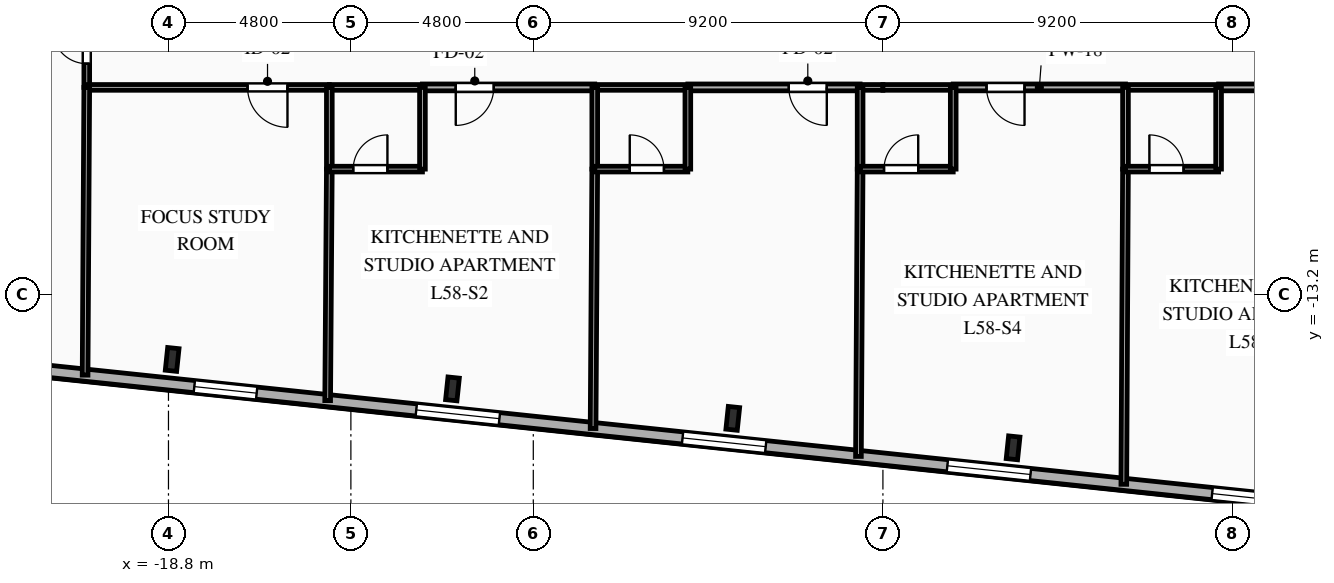
"""IFC4 building model, lengths in metres.
Left out: names, types, materials, properties, quantities, classifications, styles, units other than length and angle.
Written with IfcOpenShell. Run it as: python <this file> out.ifc"""

import sys

from ifc_helpers import new_model, si_unit, direction, frame, frame_2d, origin, origin_2d, place, context, subcontext, project, spatial, rectangle, i_section, extrude, element, fill, save


model = new_model("IFC4")
c1 = context("Model", 3, precision=1e-05, world=origin(), true_north=direction((0.0, 1.0)))
c2 = subcontext(c1, "Body", "Model", "MODEL_VIEW")
j1 = project(units=[si_unit("LENGTHUNIT", "METRE"), si_unit("PLANEANGLEUNIT", "RADIAN")], contexts=[c1])
p1 = place(None, origin())
s1 = spatial("IfcSite", under=j1, at=p1, CompositionType="ELEMENT")
p2 = place(p1, origin())
s2 = spatial("IfcBuilding", under=s1, at=p2, CompositionType="ELEMENT")
p3 = place(p2, frame((0.0, 0.0, 206.45)))
s3 = spatial("IfcBuildingStorey", under=s2, at=p3, CompositionType="ELEMENT", Elevation=206.45)
for number, where, z_axis, x_axis in (
    (1, (-18.703, -14.908, 0.0), (0.0, 0.0, 1.0), (0.995, -0.105, 0.0)),
    (2, (-11.327, -15.683, 0.0), (0.0, 0.0, 1.0), (0.995, -0.105, 0.0)),
    (3, (-3.951, -16.458, 0.0), (0.0, 0.0, 1.0), (0.995, -0.105, 0.0)),
    (4, (3.425, -17.233, 0.0), (0.0, 0.0, 1.0), (0.995, -0.105, 0.0)),
):
    element("IfcColumn", number, at=place(p3, frame(where, z_axis=z_axis, x_axis=x_axis)), inside=s3, PredefinedType="COLUMN", context=c2, shape_type="SweptSolid", body=[
        extrude(i_section(OverallWidth=0.3, OverallDepth=0.6, WebThickness=0.015, FlangeThickness=0.03, FilletRadius=0.027, at=origin_2d()), origin(), (0.0, 0.0, 1.0), 3.35),
    ])
p4 = place(p3, frame((18.756, -19.498, 0.0), z_axis=(0.0, 0.0, 1.0), x_axis=(-0.994522060044, 0.104526896475, 0.0)))
e5 = element("IfcWall", 5, at=p4, inside=s3, PredefinedType="SOLIDWALL", context=c2, shape_type="SweptSolid", body=[
    extrude(rectangle(XDim=45.8, YDim=0.32, at=frame_2d((22.9, 0.0))), origin(), (0.0, 0.0, 1.0), 3.04),
])
p5 = place(p4, frame((2.778, 0.0, 0.85)))
e6 = element("IfcOpeningElement", 6, at=p5, cuts=e5, PredefinedType="OPENING", context=c2, shape_type="SweptSolid", body=[
    extrude(rectangle(XDim=1.65, YDim=1.85, at=frame_2d((0.825, 0.925))), frame((0.0, 0.17, 0.0), z_axis=(0.0, -1.0, 0.0), x_axis=(1.0, 0.0, 0.0)), (0.0, 0.0, 1.0), 0.34),
])
p6 = place(p4, frame((7.948, 0.0, 0.85)))
e7 = element("IfcOpeningElement", 7, at=p6, cuts=e5, PredefinedType="OPENING", context=c2, shape_type="SweptSolid", body=[
    extrude(rectangle(XDim=2.2, YDim=1.85, at=frame_2d((1.1, 0.925))), frame((0.0, 0.17, 0.0), z_axis=(0.0, -1.0, 0.0), x_axis=(1.0, 0.0, 0.0)), (0.0, 0.0, 1.0), 0.34),
])
p7 = place(p4, frame((14.954, 0.0, 0.85)))
e8 = element("IfcOpeningElement", 8, at=p7, cuts=e5, PredefinedType="OPENING", context=c2, shape_type="SweptSolid", body=[
    extrude(rectangle(XDim=2.2, YDim=1.85, at=frame_2d((1.1, 0.925))), frame((0.0, 0.17, 0.0), z_axis=(0.0, -1.0, 0.0), x_axis=(1.0, 0.0, 0.0)), (0.0, 0.0, 1.0), 0.34),
])
p8 = place(p4, frame((21.96, 0.0, 0.85)))
e9 = element("IfcOpeningElement", 9, at=p8, cuts=e5, PredefinedType="OPENING", context=c2, shape_type="SweptSolid", body=[
    extrude(rectangle(XDim=2.2, YDim=1.85, at=frame_2d((1.1, 0.925))), frame((0.0, 0.17, 0.0), z_axis=(0.0, -1.0, 0.0), x_axis=(1.0, 0.0, 0.0)), (0.0, 0.0, 1.0), 0.34),
])
p9 = place(p4, frame((29.006, 0.0, 0.85)))
e10 = element("IfcOpeningElement", 10, at=p9, cuts=e5, PredefinedType="OPENING", context=c2, shape_type="SweptSolid", body=[
    extrude(rectangle(XDim=2.2, YDim=1.85, at=frame_2d((1.1, 0.925))), frame((0.0, 0.17, 0.0), z_axis=(0.0, -1.0, 0.0), x_axis=(1.0, 0.0, 0.0)), (0.0, 0.0, 1.0), 0.34),
])
p10 = place(p4, frame((35.429, 0.0, 0.85)))
e11 = element("IfcOpeningElement", 11, at=p10, cuts=e5, PredefinedType="OPENING", context=c2, shape_type="SweptSolid", body=[
    extrude(rectangle(XDim=1.65, YDim=1.85, at=frame_2d((0.825, 0.925))), frame((0.0, 0.17, 0.0), z_axis=(0.0, -1.0, 0.0), x_axis=(1.0, 0.0, 0.0)), (0.0, 0.0, 1.0), 0.34),
])
p11 = place(p4, frame((41.212, 0.0, 0.85)))
e12 = element("IfcOpeningElement", 12, at=p11, cuts=e5, PredefinedType="OPENING", context=c2, shape_type="SweptSolid", body=[
    extrude(rectangle(XDim=1.65, YDim=1.85, at=frame_2d((0.825, 0.925))), frame((0.0, 0.17, 0.0), z_axis=(0.0, -1.0, 0.0), x_axis=(1.0, 0.0, 0.0)), (0.0, 0.0, 1.0), 0.34),
])
p12 = place(p3, frame((-20.95, -7.75, 0.0), z_axis=(0.0, 0.0, 1.0), x_axis=(0.0, 1.0, 0.0)))
e13 = element("IfcWall", 13, at=p12, inside=s3, PredefinedType="PARTITIONING", context=c2, shape_type="SweptSolid", body=[
    extrude(rectangle(XDim=2.15, YDim=0.15, at=frame_2d((1.075, 0.0))), origin(), (0.0, 0.0, 1.0), 3.04),
])
p13 = place(p12, frame((0.625, 0.0, 0.0)))
e14 = element("IfcOpeningElement", 14, at=p13, cuts=e13, PredefinedType="OPENING", context=c2, shape_type="SweptSolid", body=[
    extrude(rectangle(XDim=0.9, YDim=2.1, at=frame_2d((0.45, 1.05))), frame((0.0, 0.085, 0.0), z_axis=(0.0, -1.0, 0.0), x_axis=(1.0, 0.0, 0.0)), (0.0, 0.0, 1.0), 0.17),
])
p14 = place(p3, frame((-14.567, -7.75, 0.0), z_axis=(0.0, 0.0, 1.0), x_axis=(-1.0, 0.0, 0.0)))
e15 = element("IfcWall", 15, at=p14, inside=s3, PredefinedType="PARTITIONING", context=c2, shape_type="SweptSolid", body=[
    extrude(rectangle(XDim=6.383, YDim=0.15, at=frame_2d((3.191, 0.0))), origin(), (0.0, 0.0, 1.0), 3.04),
])
p15 = place(p14, frame((1.102, 0.0, 0.0)))
e16 = element("IfcOpeningElement", 16, at=p15, cuts=e15, PredefinedType="OPENING", context=c2, shape_type="SweptSolid", body=[
    extrude(rectangle(XDim=1.05, YDim=2.15, at=frame_2d((0.525, 1.075))), frame((0.0, 0.085, 0.0), z_axis=(0.0, -1.0, 0.0), x_axis=(1.0, 0.0, 0.0)), (0.0, 0.0, 1.0), 0.17),
])
p16 = place(p3, frame((-7.583, -7.75, 0.0), z_axis=(0.0, 0.0, 1.0), x_axis=(-1.0, 0.0, 0.0)))
e17 = element("IfcWall", 17, at=p16, inside=s3, PredefinedType="PARTITIONING", context=c2, shape_type="SweptSolid", body=[
    extrude(rectangle(XDim=4.534, YDim=0.18, at=frame_2d((2.267, 0.0))), origin(), (0.0, 0.0, 1.0), 3.04),
])
p17 = place(p16, frame((2.657, 0.0, 0.0)))
e18 = element("IfcOpeningElement", 18, at=p17, cuts=e17, PredefinedType="OPENING", context=c2, shape_type="SweptSolid", body=[
    extrude(rectangle(XDim=1.0, YDim=2.15, at=frame_2d((0.5, 1.075))), frame((0.0, 0.1, 0.0), z_axis=(0.0, -1.0, 0.0), x_axis=(1.0, 0.0, 0.0)), (0.0, 0.0, 1.0), 0.2),
])
p18 = place(p3, frame((-12.117, -7.75, 0.0), z_axis=(0.0, 0.0, 1.0), x_axis=(-1.0, 0.0, 0.0)))
e19 = element("IfcWall", 19, at=p18, inside=s3, PredefinedType="PLUMBINGWALL", context=c2, shape_type="SweptSolid", body=[
    extrude(rectangle(XDim=2.45, YDim=0.15, at=frame_2d((1.225, 0.0))), origin(), (0.0, 0.0, 1.0), 3.04),
])
p19 = place(p3, frame((-0.6, -7.75, 0.0), z_axis=(0.0, 0.0, 1.0), x_axis=(-1.0, 0.0, 0.0)))
e20 = element("IfcWall", 20, at=p19, inside=s3, PredefinedType="PARTITIONING", context=c2, shape_type="SweptSolid", body=[
    extrude(rectangle(XDim=4.533, YDim=0.18, at=frame_2d((2.267, 0.0))), origin(), (0.0, 0.0, 1.0), 3.04),
])
p20 = place(p19, frame((0.877, 0.0, 0.0)))
e21 = element("IfcOpeningElement", 21, at=p20, cuts=e20, PredefinedType="OPENING", context=c2, shape_type="SweptSolid", body=[
    extrude(rectangle(XDim=1.0, YDim=2.15, at=frame_2d((0.5, 1.075))), frame((0.0, 0.1, 0.0), z_axis=(0.0, -1.0, 0.0), x_axis=(1.0, 0.0, 0.0)), (0.0, 0.0, 1.0), 0.2),
])
p21 = place(p3, frame((-5.133, -7.75, 0.0), z_axis=(0.0, 0.0, 1.0), x_axis=(-1.0, 0.0, 0.0)))
e22 = element("IfcWall", 22, at=p21, inside=s3, PredefinedType="PLUMBINGWALL", context=c2, shape_type="SweptSolid", body=[
    extrude(rectangle(XDim=2.45, YDim=0.15, at=frame_2d((1.225, 0.0))), origin(), (0.0, 0.0, 1.0), 3.04),
])
p22 = place(p3, frame((0.0, -7.75, 0.0), z_axis=(0.0, 0.0, 1.0), x_axis=(-1.0, 0.0, 0.0)))
e23 = element("IfcWall", 23, at=p22, inside=s3, PredefinedType="PLUMBINGWALL", context=c2, shape_type="SweptSolid", body=[
    extrude(rectangle(XDim=0.6, YDim=0.15, at=frame_2d((0.3, 0.0))), origin(), (0.0, 0.0, 1.0), 3.04),
])
p23 = place(p3, frame((6.383, -7.75, 0.0), z_axis=(0.0, 0.0, 1.0), x_axis=(-1.0, 0.0, 0.0)))
e24 = element("IfcWall", 24, at=p23, inside=s3, PredefinedType="PARTITIONING", context=c2, shape_type="SweptSolid", body=[
    extrude(rectangle(XDim=4.533, YDim=0.18, at=frame_2d((2.267, 0.0))), origin(), (0.0, 0.0, 1.0), 3.04),
])
p24 = place(p23, frame((2.656, 0.0, 0.0)))
e25 = element("IfcOpeningElement", 25, at=p24, cuts=e24, PredefinedType="OPENING", context=c2, shape_type="SweptSolid", body=[
    extrude(rectangle(XDim=1.0, YDim=2.15, at=frame_2d((0.5, 1.075))), frame((0.0, 0.1, 0.0), z_axis=(0.0, -1.0, 0.0), x_axis=(1.0, 0.0, 0.0)), (0.0, 0.0, 1.0), 0.2),
])
p25 = place(p3, frame((1.85, -7.75, 0.0), z_axis=(0.0, 0.0, 1.0), x_axis=(-1.0, 0.0, 0.0)))
e26 = element("IfcWall", 26, at=p25, inside=s3, PredefinedType="PLUMBINGWALL", context=c2, shape_type="SweptSolid", body=[
    extrude(rectangle(XDim=1.85, YDim=0.15, at=frame_2d((0.925, 0.0))), origin(), (0.0, 0.0, 1.0), 3.04),
])
p26 = place(p3, frame((13.367, -7.75, 0.0), z_axis=(0.0, 0.0, 1.0), x_axis=(-1.0, 0.0, 0.0)))
e27 = element("IfcWall", 27, at=p26, inside=s3, PredefinedType="PARTITIONING", context=c2, shape_type="SweptSolid", body=[
    extrude(rectangle(XDim=4.534, YDim=0.18, at=frame_2d((2.267, 0.0))), origin(), (0.0, 0.0, 1.0), 3.04),
])
p27 = place(p26, frame((0.877, 0.0, 0.0)))
e28 = element("IfcOpeningElement", 28, at=p27, cuts=e27, PredefinedType="OPENING", context=c2, shape_type="SweptSolid", body=[
    extrude(rectangle(XDim=1.0, YDim=2.15, at=frame_2d((0.5, 1.075))), frame((0.0, 0.1, 0.0), z_axis=(0.0, -1.0, 0.0), x_axis=(1.0, 0.0, 0.0)), (0.0, 0.0, 1.0), 0.2),
])
p28 = place(p3, frame((8.833, -7.75, 0.0), z_axis=(0.0, 0.0, 1.0), x_axis=(-1.0, 0.0, 0.0)))
e29 = element("IfcWall", 29, at=p28, inside=s3, PredefinedType="PLUMBINGWALL", context=c2, shape_type="SweptSolid", body=[
    extrude(rectangle(XDim=2.45, YDim=0.15, at=frame_2d((1.225, 0.0))), origin(), (0.0, 0.0, 1.0), 3.04),
])
p29 = place(p3, frame((-20.95, -7.75, 0.0), z_axis=(0.0, 0.0, 1.0), x_axis=(-0.005804668564, -0.99998315277, 0.0)))
e30 = element("IfcWall", 30, at=p29, inside=s3, PredefinedType="PARTITIONING", context=c2, shape_type="SweptSolid", body=[
    extrude(rectangle(XDim=7.571, YDim=0.15, at=frame_2d((3.785, 0.0))), origin(), (0.0, 0.0, 1.0), 3.04),
])
p30 = place(p3, frame((-14.567, -9.9, 0.0), z_axis=(0.0, 0.0, 1.0), x_axis=(-0.007213951996, -0.99997397911, 0.0)))
e31 = element("IfcWall", 31, at=p30, inside=s3, PredefinedType="PARTITIONING", context=c2, shape_type="SweptSolid", body=[
    extrude(rectangle(XDim=6.092, YDim=0.15, at=frame_2d((3.046, 0.0))), origin(), (0.0, 0.0, 1.0), 3.04),
])
p31 = place(p3, frame((-14.567, -7.75, 0.0), z_axis=(0.0, 0.0, 1.0), x_axis=(0.0, -1.0, 0.0)))
e32 = element("IfcWall", 32, at=p31, inside=s3, PredefinedType="PLUMBINGWALL", context=c2, shape_type="SweptSolid", body=[
    extrude(rectangle(XDim=2.15, YDim=0.15, at=frame_2d((1.075, 0.0))), origin(), (0.0, 0.0, 1.0), 3.04),
])
p32 = place(p3, frame((-14.567, -9.9, 0.0), z_axis=(0.0, 0.0, 1.0), x_axis=(1.0, 0.0, 0.0)))
e33 = element("IfcWall", 33, at=p32, inside=s3, PredefinedType="PLUMBINGWALL", context=c2, shape_type="SweptSolid", body=[
    extrude(rectangle(XDim=2.45, YDim=0.15, at=frame_2d((1.225, 0.0))), origin(), (0.0, 0.0, 1.0), 3.04),
])
p33 = place(p32, frame((0.629, 0.0, 0.0)))
e34 = element("IfcOpeningElement", 34, at=p33, cuts=e33, PredefinedType="OPENING", context=c2, shape_type="SweptSolid", body=[
    extrude(rectangle(XDim=0.9, YDim=2.1, at=frame_2d((0.45, 1.05))), frame((0.0, 0.085, 0.0), z_axis=(0.0, -1.0, 0.0), x_axis=(1.0, 0.0, 0.0)), (0.0, 0.0, 1.0), 0.17),
])
p34 = place(p3, frame((-12.117, -9.9, 0.0), z_axis=(0.0, 0.0, 1.0), x_axis=(0.0, 1.0, 0.0)))
e35 = element("IfcWall", 35, at=p34, inside=s3, PredefinedType="PLUMBINGWALL", context=c2, shape_type="SweptSolid", body=[
    extrude(rectangle(XDim=2.15, YDim=0.15, at=frame_2d((1.075, 0.0))), origin(), (0.0, 0.0, 1.0), 3.04),
])
p35 = place(p3, frame((-7.583, -9.9, 0.0), z_axis=(0.0, 0.0, 1.0), x_axis=(-0.006438095341, -0.999979275249, 0.0)))
e36 = element("IfcWall", 36, at=p35, inside=s3, PredefinedType="PARTITIONING", context=c2, shape_type="SweptSolid", body=[
    extrude(rectangle(XDim=6.826, YDim=0.15, at=frame_2d((3.413, 0.0))), origin(), (0.0, 0.0, 1.0), 3.04),
])
p36 = place(p3, frame((-7.583, -7.75, 0.0), z_axis=(0.0, 0.0, 1.0), x_axis=(0.0, -1.0, 0.0)))
e37 = element("IfcWall", 37, at=p36, inside=s3, PredefinedType="PLUMBINGWALL", context=c2, shape_type="SweptSolid", body=[
    extrude(rectangle(XDim=2.15, YDim=0.15, at=frame_2d((1.075, 0.0))), origin(), (0.0, 0.0, 1.0), 3.04),
])
p37 = place(p3, frame((-7.583, -9.9, 0.0), z_axis=(0.0, 0.0, 1.0), x_axis=(1.0, 0.0, 0.0)))
e38 = element("IfcWall", 38, at=p37, inside=s3, PredefinedType="PLUMBINGWALL", context=c2, shape_type="SweptSolid", body=[
    extrude(rectangle(XDim=2.45, YDim=0.15, at=frame_2d((1.225, 0.0))), origin(), (0.0, 0.0, 1.0), 3.04),
])
p38 = place(p37, frame((0.921, 0.0, 0.0)))
e39 = element("IfcOpeningElement", 39, at=p38, cuts=e38, PredefinedType="OPENING", context=c2, shape_type="SweptSolid", body=[
    extrude(rectangle(XDim=0.9, YDim=2.1, at=frame_2d((0.45, 1.05))), frame((0.0, 0.085, 0.0), z_axis=(0.0, -1.0, 0.0), x_axis=(1.0, 0.0, 0.0)), (0.0, 0.0, 1.0), 0.17),
])
p39 = place(p3, frame((-5.133, -9.9, 0.0), z_axis=(0.0, 0.0, 1.0), x_axis=(0.0, 1.0, 0.0)))
e40 = element("IfcWall", 40, at=p39, inside=s3, PredefinedType="PLUMBINGWALL", context=c2, shape_type="SweptSolid", body=[
    extrude(rectangle(XDim=2.15, YDim=0.15, at=frame_2d((1.075, 0.0))), origin(), (0.0, 0.0, 1.0), 3.04),
])
p40 = place(p3, frame((-0.6, -9.9, 0.0), z_axis=(0.0, 0.0, 1.0), x_axis=(-0.005780810266, -0.999983290977, 0.0)))
e41 = element("IfcWall", 41, at=p40, inside=s3, PredefinedType="PARTITIONING", context=c2, shape_type="SweptSolid", body=[
    extrude(rectangle(XDim=7.56, YDim=0.15, at=frame_2d((3.78, 0.0))), origin(), (0.0, 0.0, 1.0), 3.04),
])
p41 = place(p3, frame((-0.6, -7.75, 0.0), z_axis=(0.0, 0.0, 1.0), x_axis=(0.0, -1.0, 0.0)))
e42 = element("IfcWall", 42, at=p41, inside=s3, PredefinedType="PLUMBINGWALL", context=c2, shape_type="SweptSolid", body=[
    extrude(rectangle(XDim=2.15, YDim=0.15, at=frame_2d((1.075, 0.0))), origin(), (0.0, 0.0, 1.0), 3.04),
])
p42 = place(p3, frame((-0.6, -9.9, 0.0), z_axis=(0.0, 0.0, 1.0), x_axis=(1.0, 0.0, 0.0)))
e43 = element("IfcWall", 43, at=p42, inside=s3, PredefinedType="PLUMBINGWALL", context=c2, shape_type="SweptSolid", body=[
    extrude(rectangle(XDim=2.45, YDim=0.15, at=frame_2d((1.225, 0.0))), origin(), (0.0, 0.0, 1.0), 3.04),
])
p43 = place(p42, frame((0.629, 0.0, 0.0)))
e44 = element("IfcOpeningElement", 44, at=p43, cuts=e43, PredefinedType="OPENING", context=c2, shape_type="SweptSolid", body=[
    extrude(rectangle(XDim=0.9, YDim=2.1, at=frame_2d((0.45, 1.05))), frame((0.0, 0.085, 0.0), z_axis=(0.0, -1.0, 0.0), x_axis=(1.0, 0.0, 0.0)), (0.0, 0.0, 1.0), 0.17),
])
p44 = place(p3, frame((1.85, -9.9, 0.0), z_axis=(0.0, 0.0, 1.0), x_axis=(0.0, 1.0, 0.0)))
e45 = element("IfcWall", 45, at=p44, inside=s3, PredefinedType="PLUMBINGWALL", context=c2, shape_type="SweptSolid", body=[
    extrude(rectangle(XDim=2.15, YDim=0.15, at=frame_2d((1.075, 0.0))), origin(), (0.0, 0.0, 1.0), 3.04),
])
p45 = place(p3, frame((6.383, -9.9, 0.0), z_axis=(0.0, 0.0, 1.0), x_axis=(-0.005298718667, -0.999985961692, 0.0)))
e46 = element("IfcWall", 46, at=p45, inside=s3, PredefinedType="PARTITIONING", context=c2, shape_type="SweptSolid", body=[
    extrude(rectangle(XDim=8.293, YDim=0.15, at=frame_2d((4.147, 0.0))), origin(), (0.0, 0.0, 1.0), 3.04),
])
p46 = place(p3, frame((6.383, -7.75, 0.0), z_axis=(0.0, 0.0, 1.0), x_axis=(0.0, -1.0, 0.0)))
e47 = element("IfcWall", 47, at=p46, inside=s3, PredefinedType="PLUMBINGWALL", context=c2, shape_type="SweptSolid", body=[
    extrude(rectangle(XDim=2.15, YDim=0.15, at=frame_2d((1.075, 0.0))), origin(), (0.0, 0.0, 1.0), 3.04),
])
p47 = place(p3, frame((6.383, -9.9, 0.0), z_axis=(0.0, 0.0, 1.0), x_axis=(1.0, 0.0, 0.0)))
e48 = element("IfcWall", 48, at=p47, inside=s3, PredefinedType="PLUMBINGWALL", context=c2, shape_type="SweptSolid", body=[
    extrude(rectangle(XDim=2.45, YDim=0.15, at=frame_2d((1.225, 0.0))), origin(), (0.0, 0.0, 1.0), 3.04),
])
p48 = place(p47, frame((0.629, 0.0, 0.0)))
e49 = element("IfcOpeningElement", 49, at=p48, cuts=e48, PredefinedType="OPENING", context=c2, shape_type="SweptSolid", body=[
    extrude(rectangle(XDim=0.9, YDim=2.1, at=frame_2d((0.45, 1.05))), frame((0.0, 0.085, 0.0), z_axis=(0.0, -1.0, 0.0), x_axis=(1.0, 0.0, 0.0)), (0.0, 0.0, 1.0), 0.17),
])
p49 = place(p3, frame((8.833, -9.9, 0.0), z_axis=(0.0, 0.0, 1.0), x_axis=(0.0, 1.0, 0.0)))
e50 = element("IfcWall", 50, at=p49, inside=s3, PredefinedType="PLUMBINGWALL", context=c2, shape_type="SweptSolid", body=[
    extrude(rectangle(XDim=2.15, YDim=0.15, at=frame_2d((1.075, 0.0))), origin(), (0.0, 0.0, 1.0), 3.04),
])
p50 = place(p6, origin())
e51 = element("IfcWindow", 51, at=p50, inside=s3, PartitioningType="SINGLE_PANEL", PredefinedType="WINDOW", context=c2, shape_type="SweptSolid", body=[
    extrude(rectangle(XDim=2.2, YDim=1.85, at=frame_2d((1.1, 0.925))), frame((0.0, 0.03, 0.0), z_axis=(0.0, -1.0, 0.0), x_axis=(1.0, 0.0, 0.0)), (0.0, 0.0, 1.0), 0.06),
])
fill(e7, e51)
p51 = place(p7, origin())
e52 = element("IfcWindow", 52, at=p51, inside=s3, PartitioningType="SINGLE_PANEL", PredefinedType="WINDOW", context=c2, shape_type="SweptSolid", body=[
    extrude(rectangle(XDim=2.2, YDim=1.85, at=frame_2d((1.1, 0.925))), frame((0.0, 0.03, 0.0), z_axis=(0.0, -1.0, 0.0), x_axis=(1.0, 0.0, 0.0)), (0.0, 0.0, 1.0), 0.06),
])
fill(e8, e52)
p52 = place(p8, origin())
e53 = element("IfcWindow", 53, at=p52, inside=s3, PartitioningType="SINGLE_PANEL", PredefinedType="WINDOW", context=c2, shape_type="SweptSolid", body=[
    extrude(rectangle(XDim=2.2, YDim=1.85, at=frame_2d((1.1, 0.925))), frame((0.0, 0.03, 0.0), z_axis=(0.0, -1.0, 0.0), x_axis=(1.0, 0.0, 0.0)), (0.0, 0.0, 1.0), 0.06),
])
fill(e9, e53)
p53 = place(p9, origin())
e54 = element("IfcWindow", 54, at=p53, inside=s3, PartitioningType="SINGLE_PANEL", PredefinedType="WINDOW", context=c2, shape_type="SweptSolid", body=[
    extrude(rectangle(XDim=2.2, YDim=1.85, at=frame_2d((1.1, 0.925))), frame((0.0, 0.03, 0.0), z_axis=(0.0, -1.0, 0.0), x_axis=(1.0, 0.0, 0.0)), (0.0, 0.0, 1.0), 0.06),
])
fill(e10, e54)
p54 = place(p10, origin())
e55 = element("IfcWindow", 55, at=p54, inside=s3, PartitioningType="SINGLE_PANEL", PredefinedType="WINDOW", context=c2, shape_type="SweptSolid", body=[
    extrude(rectangle(XDim=1.65, YDim=1.85, at=frame_2d((0.825, 0.925))), frame((0.0, 0.03, 0.0), z_axis=(0.0, -1.0, 0.0), x_axis=(1.0, 0.0, 0.0)), (0.0, 0.0, 1.0), 0.06),
])
fill(e11, e55)
p55 = place(p13, origin())
e56 = element("IfcDoor", 56, at=p55, inside=s3, OperationType="SINGLE_SWING_RIGHT", PredefinedType="DOOR", context=c2, shape_type="SweptSolid", body=[
    extrude(rectangle(XDim=0.9, YDim=2.1, at=frame_2d((0.45, 1.05))), frame((0.0, 0.025, 0.0), z_axis=(0.0, -1.0, 0.0), x_axis=(1.0, 0.0, 0.0)), (0.0, 0.0, 1.0), 0.05),
])
fill(e14, e56)
p56 = place(p15, origin())
e57 = element("IfcDoor", 57, at=p56, inside=s3, OperationType="SINGLE_SWING_LEFT", PredefinedType="DOOR", context=c2, shape_type="SweptSolid", body=[
    extrude(rectangle(XDim=1.05, YDim=2.15, at=frame_2d((0.525, 1.075))), frame((0.0, 0.025, 0.0), z_axis=(0.0, -1.0, 0.0), x_axis=(1.0, 0.0, 0.0)), (0.0, 0.0, 1.0), 0.05),
])
fill(e16, e57)
p57 = place(p17, origin())
e58 = element("IfcDoor", 58, at=p57, inside=s3, OperationType="SINGLE_SWING_RIGHT", PredefinedType="DOOR", context=c2, shape_type="SweptSolid", body=[
    extrude(rectangle(XDim=1.0, YDim=2.15, at=frame_2d((0.5, 1.075))), frame((0.0, 0.025, 0.0), z_axis=(0.0, -1.0, 0.0), x_axis=(1.0, 0.0, 0.0)), (0.0, 0.0, 1.0), 0.05),
])
fill(e18, e58)
p58 = place(p20, origin())
e59 = element("IfcDoor", 59, at=p58, inside=s3, OperationType="SINGLE_SWING_LEFT", PredefinedType="DOOR", context=c2, shape_type="SweptSolid", body=[
    extrude(rectangle(XDim=1.0, YDim=2.15, at=frame_2d((0.5, 1.075))), frame((0.0, 0.025, 0.0), z_axis=(0.0, -1.0, 0.0), x_axis=(1.0, 0.0, 0.0)), (0.0, 0.0, 1.0), 0.05),
])
fill(e21, e59)
p59 = place(p24, origin())
e60 = element("IfcDoor", 60, at=p59, inside=s3, OperationType="SINGLE_SWING_LEFT", PredefinedType="DOOR", context=c2, shape_type="SweptSolid", body=[
    extrude(rectangle(XDim=1.0, YDim=2.15, at=frame_2d((0.5, 1.075))), frame((0.0, 0.025, 0.0), z_axis=(0.0, -1.0, 0.0), x_axis=(1.0, 0.0, 0.0)), (0.0, 0.0, 1.0), 0.05),
])
fill(e25, e60)
p60 = place(p33, origin())
e61 = element("IfcDoor", 61, at=p60, inside=s3, OperationType="SINGLE_SWING_RIGHT", PredefinedType="DOOR", context=c2, shape_type="SweptSolid", body=[
    extrude(rectangle(XDim=0.9, YDim=2.1, at=frame_2d((0.45, 1.05))), frame((0.0, 0.025, 0.0), z_axis=(0.0, -1.0, 0.0), x_axis=(1.0, 0.0, 0.0)), (0.0, 0.0, 1.0), 0.05),
])
fill(e34, e61)
p61 = place(p38, origin())
e62 = element("IfcDoor", 62, at=p61, inside=s3, OperationType="SINGLE_SWING_LEFT", PredefinedType="DOOR", context=c2, shape_type="SweptSolid", body=[
    extrude(rectangle(XDim=0.9, YDim=2.1, at=frame_2d((0.45, 1.05))), frame((0.0, 0.025, 0.0), z_axis=(0.0, -1.0, 0.0), x_axis=(1.0, 0.0, 0.0)), (0.0, 0.0, 1.0), 0.05),
])
fill(e39, e62)
p62 = place(p43, origin())
e63 = element("IfcDoor", 63, at=p62, inside=s3, OperationType="SINGLE_SWING_RIGHT", PredefinedType="DOOR", context=c2, shape_type="SweptSolid", body=[
    extrude(rectangle(XDim=0.9, YDim=2.1, at=frame_2d((0.45, 1.05))), frame((0.0, 0.025, 0.0), z_axis=(0.0, -1.0, 0.0), x_axis=(1.0, 0.0, 0.0)), (0.0, 0.0, 1.0), 0.05),
])
fill(e44, e63)
p63 = place(p48, origin())
e64 = element("IfcDoor", 64, at=p63, inside=s3, OperationType="SINGLE_SWING_LEFT", PredefinedType="DOOR", context=c2, shape_type="SweptSolid", body=[
    extrude(rectangle(XDim=0.9, YDim=2.1, at=frame_2d((0.45, 1.05))), frame((0.0, 0.025, 0.0), z_axis=(0.0, -1.0, 0.0), x_axis=(1.0, 0.0, 0.0)), (0.0, 0.0, 1.0), 0.05),
])
fill(e49, e64)
save(model, sys.argv[1])
